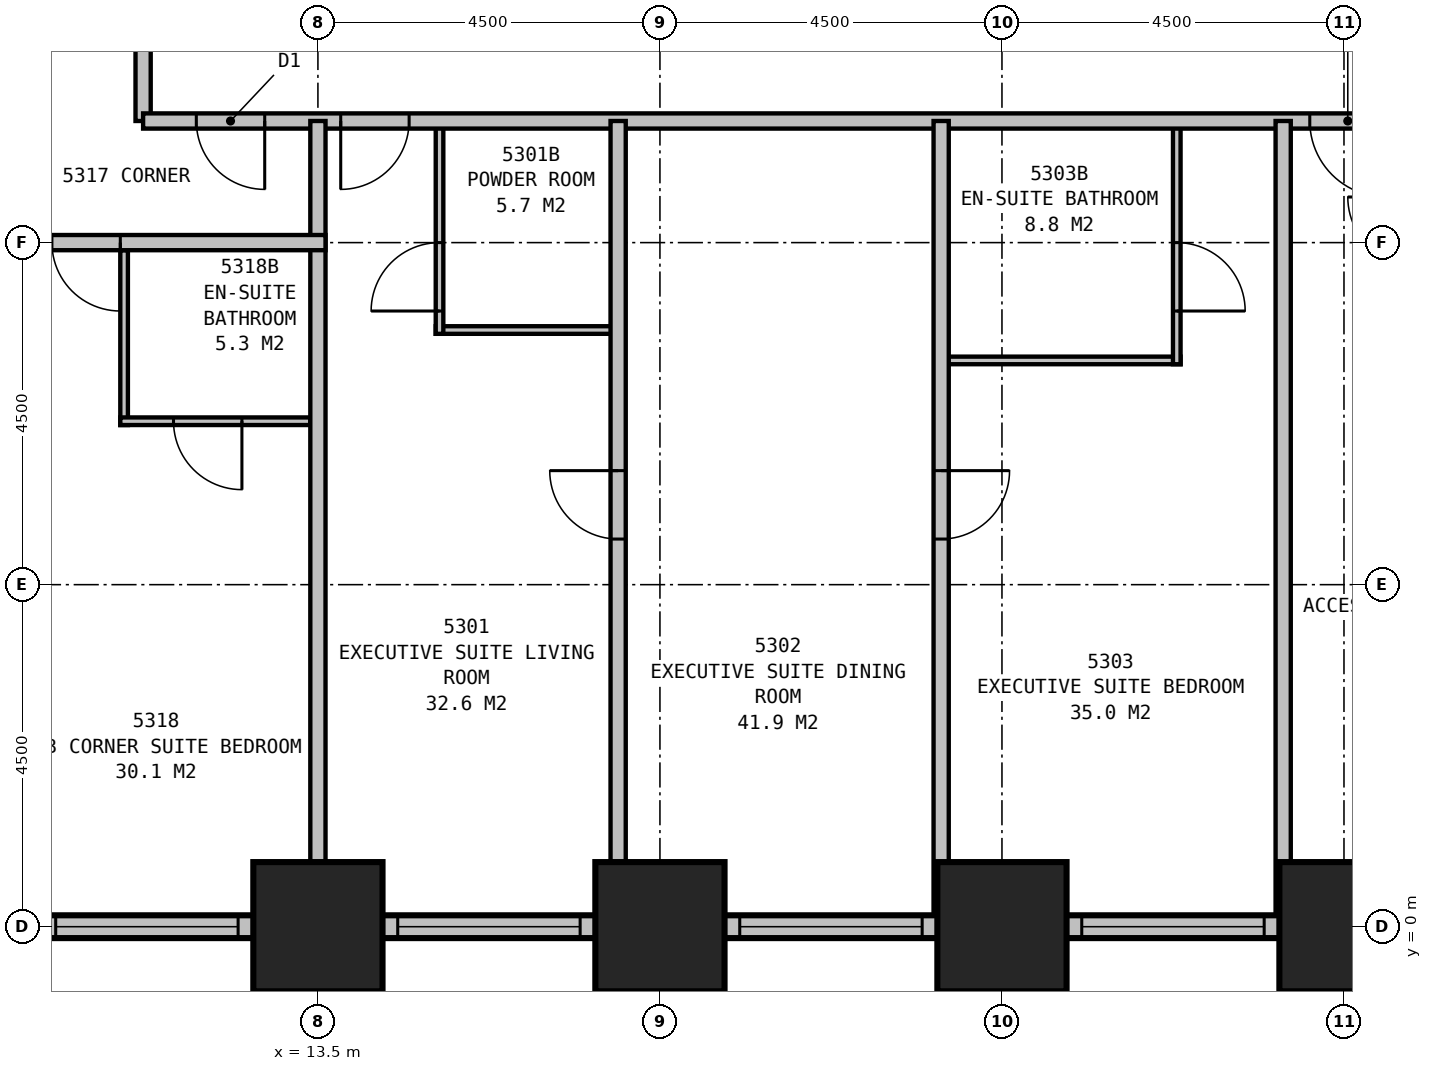
"""IFC4 building model, lengths in metres.
Left out: names, types, materials, properties, quantities, classifications, styles, units other than length and angle.
Written with IfcOpenShell. Run it as: python <this file> out.ifc"""

import sys

from ifc_helpers import new_model, si_unit, direction, frame, frame_2d, origin, origin_2d, place, context, subcontext, project, spatial, rectangle, extrude, element, fill, save


model = new_model("IFC4")
c1 = context("Model", 3, precision=1e-05, world=origin(), true_north=direction((0.0, 1.0)))
c2 = subcontext(c1, "Body", "Model", "MODEL_VIEW")
j1 = project(units=[si_unit("LENGTHUNIT", "METRE"), si_unit("PLANEANGLEUNIT", "RADIAN")], contexts=[c1])
p1 = place(None, origin())
s1 = spatial("IfcSite", under=j1, at=p1, CompositionType="ELEMENT")
p2 = place(p1, origin())
s2 = spatial("IfcBuilding", under=s1, at=p2, CompositionType="ELEMENT")
p3 = place(p2, frame((0.0, 0.0, 204.4)))
s3 = spatial("IfcBuildingStorey", under=s2, at=p3, CompositionType="ELEMENT", Elevation=204.4)
for number, where, z_axis, x_axis in (
    (1, (13.5, 0.0, 0.0), (0.0, 0.0, 1.0), (1.0, 0.0, 0.0)),
    (2, (18.0, 0.0, 0.0), (0.0, 0.0, 1.0), (1.0, 0.0, 0.0)),
    (3, (22.5, 0.0, 0.0), (0.0, 0.0, 1.0), (1.0, 0.0, 0.0)),
    (4, (27.0, 0.0, 0.0), (0.0, 0.0, 1.0), (1.0, 0.0, 0.0)),
):
    element("IfcColumn", number, at=place(p3, frame(where, z_axis=z_axis, x_axis=x_axis)), inside=s3, PredefinedType="COLUMN", context=c2, shape_type="SweptSolid", body=[
        extrude(rectangle(XDim=1.7, YDim=1.7, at=origin_2d()), origin(), (0.0, 0.0, 1.0), 3.5),
    ])
p4 = place(p3, frame((8.85, 0.0, 0.0), z_axis=(0.0, 0.0, 1.0), x_axis=(1.0, 0.0, 0.0)))
e5 = element("IfcWall", 5, at=p4, inside=s3, PredefinedType="STANDARD", context=c2, shape_type="SweptSolid", body=[
    extrude(rectangle(XDim=36.3, YDim=0.3, at=frame_2d((18.15, 0.0))), origin(), (0.0, 0.0, 1.0), 2.25),
])
p5 = place(p4, frame((1.2, 0.0, 0.5)))
e6 = element("IfcOpeningElement", 6, at=p5, cuts=e5, PredefinedType="OPENING", context=c2, shape_type="SweptSolid", body=[
    extrude(rectangle(XDim=2.4, YDim=1.6, at=frame_2d((1.2, 0.8))), frame((0.0, 0.16, 0.0), z_axis=(0.0, -1.0, 0.0), x_axis=(1.0, 0.0, 0.0)), (0.0, 0.0, 1.0), 0.32),
])
p6 = place(p4, frame((5.7, 0.0, 0.5)))
e7 = element("IfcOpeningElement", 7, at=p6, cuts=e5, PredefinedType="OPENING", context=c2, shape_type="SweptSolid", body=[
    extrude(rectangle(XDim=2.4, YDim=1.6, at=frame_2d((1.2, 0.8))), frame((0.0, 0.16, 0.0), z_axis=(0.0, -1.0, 0.0), x_axis=(1.0, 0.0, 0.0)), (0.0, 0.0, 1.0), 0.32),
])
p7 = place(p4, frame((10.2, 0.0, 0.5)))
e8 = element("IfcOpeningElement", 8, at=p7, cuts=e5, PredefinedType="OPENING", context=c2, shape_type="SweptSolid", body=[
    extrude(rectangle(XDim=2.4, YDim=1.6, at=frame_2d((1.2, 0.8))), frame((0.0, 0.16, 0.0), z_axis=(0.0, -1.0, 0.0), x_axis=(1.0, 0.0, 0.0)), (0.0, 0.0, 1.0), 0.32),
])
p8 = place(p4, frame((14.7, 0.0, 0.5)))
e9 = element("IfcOpeningElement", 9, at=p8, cuts=e5, PredefinedType="OPENING", context=c2, shape_type="SweptSolid", body=[
    extrude(rectangle(XDim=2.4, YDim=1.6, at=frame_2d((1.2, 0.8))), frame((0.0, 0.16, 0.0), z_axis=(0.0, -1.0, 0.0), x_axis=(1.0, 0.0, 0.0)), (0.0, 0.0, 1.0), 0.32),
])
p9 = place(p4, frame((19.2, 0.0, 0.5)))
e10 = element("IfcOpeningElement", 10, at=p9, cuts=e5, PredefinedType="OPENING", context=c2, shape_type="SweptSolid", body=[
    extrude(rectangle(XDim=2.4, YDim=1.6, at=frame_2d((1.2, 0.8))), frame((0.0, 0.16, 0.0), z_axis=(0.0, -1.0, 0.0), x_axis=(1.0, 0.0, 0.0)), (0.0, 0.0, 1.0), 0.32),
])
p10 = place(p4, frame((23.7, 0.0, 0.5)))
e11 = element("IfcOpeningElement", 11, at=p10, cuts=e5, PredefinedType="OPENING", context=c2, shape_type="SweptSolid", body=[
    extrude(rectangle(XDim=2.4, YDim=1.6, at=frame_2d((1.2, 0.8))), frame((0.0, 0.16, 0.0), z_axis=(0.0, -1.0, 0.0), x_axis=(1.0, 0.0, 0.0)), (0.0, 0.0, 1.0), 0.32),
])
p11 = place(p4, frame((28.2, 0.0, 0.5)))
e12 = element("IfcOpeningElement", 12, at=p11, cuts=e5, PredefinedType="OPENING", context=c2, shape_type="SweptSolid", body=[
    extrude(rectangle(XDim=2.4, YDim=1.6, at=frame_2d((1.2, 0.8))), frame((0.0, 0.16, 0.0), z_axis=(0.0, -1.0, 0.0), x_axis=(1.0, 0.0, 0.0)), (0.0, 0.0, 1.0), 0.32),
])
p12 = place(p4, frame((32.7, 0.0, 0.5)))
e13 = element("IfcOpeningElement", 13, at=p12, cuts=e5, PredefinedType="OPENING", context=c2, shape_type="SweptSolid", body=[
    extrude(rectangle(XDim=2.4, YDim=1.6, at=frame_2d((1.2, 0.8))), frame((0.0, 0.16, 0.0), z_axis=(0.0, -1.0, 0.0), x_axis=(1.0, 0.0, 0.0)), (0.0, 0.0, 1.0), 0.32),
])
p13 = place(p3, frame((11.2, 10.6, 0.0), z_axis=(0.0, 0.0, 1.0), x_axis=(1.0, 0.0, 0.0)))
e14 = element("IfcWall", 14, at=p13, inside=s3, PredefinedType="PARTITIONING", context=c2, shape_type="SweptSolid", body=[
    extrude(rectangle(XDim=27.1, YDim=0.2, at=frame_2d((13.55, 0.0))), origin(), (0.0, 0.0, 1.0), 3.25),
])
p14 = place(p13, frame((3.5, 0.0, 0.0), z_axis=(0.0, 0.0, 1.0), x_axis=(-1.0, 0.0, 0.0)))
e15 = element("IfcOpeningElement", 15, at=p14, cuts=e14, PredefinedType="OPENING", context=c2, shape_type="SweptSolid", body=[
    extrude(rectangle(XDim=0.9, YDim=2.1, at=frame_2d((0.45, 1.05))), frame((0.0, 0.11, 0.0), z_axis=(0.0, -1.0, 0.0), x_axis=(1.0, 0.0, 0.0)), (0.0, 0.0, 1.0), 0.22),
])
p15 = place(p13, frame((16.35, 0.0, 0.0), z_axis=(0.0, 0.0, 1.0), x_axis=(-1.0, 0.0, 0.0)))
e16 = element("IfcOpeningElement", 16, at=p15, cuts=e14, PredefinedType="OPENING", context=c2, shape_type="SweptSolid", body=[
    extrude(rectangle(XDim=1.0, YDim=2.1, at=frame_2d((0.5, 1.05))), frame((0.0, 0.11, 0.0), z_axis=(0.0, -1.0, 0.0), x_axis=(1.0, 0.0, 0.0)), (0.0, 0.0, 1.0), 0.22),
])
p16 = place(p13, frame((21.65, 0.0, 0.0), z_axis=(0.0, 0.0, 1.0), x_axis=(-1.0, 0.0, 0.0)))
e17 = element("IfcOpeningElement", 17, at=p16, cuts=e14, PredefinedType="OPENING", context=c2, shape_type="SweptSolid", body=[
    extrude(rectangle(XDim=0.9, YDim=2.1, at=frame_2d((0.45, 1.05))), frame((0.0, 0.11, 0.0), z_axis=(0.0, -1.0, 0.0), x_axis=(1.0, 0.0, 0.0)), (0.0, 0.0, 1.0), 0.22),
])
p17 = place(p13, frame((1.6, 0.0, 0.0), z_axis=(0.0, 0.0, 1.0), x_axis=(-1.0, 0.0, 0.0)))
e18 = element("IfcOpeningElement", 18, at=p17, cuts=e14, PredefinedType="OPENING", context=c2, shape_type="SweptSolid", body=[
    extrude(rectangle(XDim=0.9, YDim=2.1, at=frame_2d((0.45, 1.05))), frame((0.0, 0.11, 0.0), z_axis=(0.0, -1.0, 0.0), x_axis=(1.0, 0.0, 0.0)), (0.0, 0.0, 1.0), 0.22),
])
p18 = place(p13, frame((26.4, 0.0, 0.0), z_axis=(0.0, 0.0, 1.0), x_axis=(-1.0, 0.0, 0.0)))
e19 = element("IfcOpeningElement", 19, at=p18, cuts=e14, PredefinedType="OPENING", context=c2, shape_type="SweptSolid", body=[
    extrude(rectangle(XDim=0.9, YDim=2.1, at=frame_2d((0.45, 1.05))), frame((0.0, 0.11, 0.0), z_axis=(0.0, -1.0, 0.0), x_axis=(1.0, 0.0, 0.0)), (0.0, 0.0, 1.0), 0.22),
])
p19 = place(p3, frame((11.2, 10.6, 0.0), z_axis=(0.0, 0.0, 1.0), x_axis=(0.0, 1.0, 0.0)))
e20 = element("IfcWall", 20, at=p19, inside=s3, PredefinedType="PARTITIONING", context=c2, shape_type="SweptSolid", body=[
    extrude(rectangle(XDim=18.7, YDim=0.2, at=frame_2d((9.35, 0.0))), origin(), (0.0, 0.0, 1.0), 3.25),
])
p20 = place(p19, frame((4.9, 0.0, 0.0)))
e21 = element("IfcOpeningElement", 21, at=p20, cuts=e20, PredefinedType="OPENING", context=c2, shape_type="SweptSolid", body=[
    extrude(rectangle(XDim=1.0, YDim=2.1, at=frame_2d((0.5, 1.05))), frame((0.0, 0.11, 0.0), z_axis=(0.0, -1.0, 0.0), x_axis=(1.0, 0.0, 0.0)), (0.0, 0.0, 1.0), 0.22),
])
p21 = place(p19, frame((9.35, 0.0, 0.0)))
e22 = element("IfcOpeningElement", 22, at=p21, cuts=e20, PredefinedType="OPENING", context=c2, shape_type="SweptSolid", body=[
    extrude(rectangle(XDim=0.9, YDim=2.1, at=frame_2d((0.45, 1.05))), frame((0.0, 0.11, 0.0), z_axis=(0.0, -1.0, 0.0), x_axis=(1.0, 0.0, 0.0)), (0.0, 0.0, 1.0), 0.22),
])
p22 = place(p3, frame((17.45, 10.6, 0.0), z_axis=(0.0, 0.0, 1.0), x_axis=(0.0, -1.0, 0.0)))
e23 = element("IfcWall", 23, at=p22, inside=s3, PredefinedType="PARTITIONING", context=c2, shape_type="SweptSolid", body=[
    extrude(rectangle(XDim=10.6, YDim=0.2, at=frame_2d((5.3, 0.0))), origin(), (0.0, 0.0, 1.0), 2.25),
])
p23 = place(p22, frame((5.5, 0.0, 0.0), z_axis=(0.0, 0.0, 1.0), x_axis=(-1.0, 0.0, 0.0)))
e24 = element("IfcOpeningElement", 24, at=p23, cuts=e23, PredefinedType="OPENING", context=c2, shape_type="SweptSolid", body=[
    extrude(rectangle(XDim=0.9, YDim=2.1, at=frame_2d((0.45, 1.05))), frame((0.0, 0.11, 0.0), z_axis=(0.0, -1.0, 0.0), x_axis=(1.0, 0.0, 0.0)), (0.0, 0.0, 1.0), 0.22),
])
p24 = place(p3, frame((21.7, 10.6, 0.0), z_axis=(0.0, 0.0, 1.0), x_axis=(0.0, -1.0, 0.0)))
e25 = element("IfcWall", 25, at=p24, inside=s3, PredefinedType="PARTITIONING", context=c2, shape_type="SweptSolid", body=[
    extrude(rectangle(XDim=10.6, YDim=0.2, at=frame_2d((5.3, 0.0))), origin(), (0.0, 0.0, 1.0), 2.25),
])
p25 = place(p24, frame((4.6, 0.0, 0.0)))
e26 = element("IfcOpeningElement", 26, at=p25, cuts=e25, PredefinedType="OPENING", context=c2, shape_type="SweptSolid", body=[
    extrude(rectangle(XDim=0.9, YDim=2.1, at=frame_2d((0.45, 1.05))), frame((0.0, 0.11, 0.0), z_axis=(0.0, -1.0, 0.0), x_axis=(1.0, 0.0, 0.0)), (0.0, 0.0, 1.0), 0.22),
])
p26 = place(p3, frame((26.2, 10.6, 0.0), z_axis=(0.0, 0.0, 1.0), x_axis=(0.0, -1.0, 0.0)))
e27 = element("IfcWall", 27, at=p26, inside=s3, PredefinedType="PARTITIONING", context=c2, shape_type="SweptSolid", body=[
    extrude(rectangle(XDim=10.6, YDim=0.2, at=frame_2d((5.3, 0.0))), origin(), (0.0, 0.0, 1.0), 2.25),
])
p27 = place(p3, frame((15.05, 7.85, 0.0), z_axis=(0.0, 0.0, 1.0), x_axis=(1.0, 0.0, 0.0)))
e28 = element("IfcWall", 28, at=p27, inside=s3, PredefinedType="PLUMBINGWALL", context=c2, shape_type="SweptSolid", body=[
    extrude(rectangle(XDim=2.4, YDim=0.1, at=frame_2d((1.2, 0.0))), origin(), (0.0, 0.0, 1.0), 3.25),
])
p28 = place(p3, frame((15.1, 10.6, 0.0), z_axis=(0.0, 0.0, 1.0), x_axis=(0.0, -1.0, 0.0)))
e29 = element("IfcWall", 29, at=p28, inside=s3, PredefinedType="PLUMBINGWALL", context=c2, shape_type="SweptSolid", body=[
    extrude(rectangle(XDim=2.8, YDim=0.1, at=frame_2d((1.4, 0.0))), origin(), (0.0, 0.0, 1.0), 3.25),
])
p29 = place(p28, frame((2.5, 0.0, 0.0), z_axis=(0.0, 0.0, 1.0), x_axis=(-1.0, 0.0, 0.0)))
e30 = element("IfcOpeningElement", 30, at=p29, cuts=e29, PredefinedType="OPENING", context=c2, shape_type="SweptSolid", body=[
    extrude(rectangle(XDim=0.9, YDim=2.1, at=frame_2d((0.45, 1.05))), frame((0.0, 0.06, 0.0), z_axis=(0.0, -1.0, 0.0), x_axis=(1.0, 0.0, 0.0)), (0.0, 0.0, 1.0), 0.12),
])
p30 = place(p3, frame((21.7, 7.45, 0.0), z_axis=(0.0, 0.0, 1.0), x_axis=(1.0, 0.0, 0.0)))
e31 = element("IfcWall", 31, at=p30, inside=s3, PredefinedType="PLUMBINGWALL", context=c2, shape_type="SweptSolid", body=[
    extrude(rectangle(XDim=3.15, YDim=0.1, at=frame_2d((1.575, 0.0))), origin(), (0.0, 0.0, 1.0), 3.25),
])
p31 = place(p3, frame((24.8, 10.6, 0.0), z_axis=(0.0, 0.0, 1.0), x_axis=(0.0, -1.0, 0.0)))
e32 = element("IfcWall", 32, at=p31, inside=s3, PredefinedType="PLUMBINGWALL", context=c2, shape_type="SweptSolid", body=[
    extrude(rectangle(XDim=3.2, YDim=0.1, at=frame_2d((1.6, 0.0))), origin(), (0.0, 0.0, 1.0), 3.25),
])
p32 = place(p31, frame((1.6, 0.0, 0.0)))
e33 = element("IfcOpeningElement", 33, at=p32, cuts=e32, PredefinedType="OPENING", context=c2, shape_type="SweptSolid", body=[
    extrude(rectangle(XDim=0.9, YDim=2.1, at=frame_2d((0.45, 1.05))), frame((0.0, 0.06, 0.0), z_axis=(0.0, -1.0, 0.0), x_axis=(1.0, 0.0, 0.0)), (0.0, 0.0, 1.0), 0.12),
])
p33 = place(p3, frame((13.5, 10.6, 0.0), z_axis=(0.0, 0.0, 1.0), x_axis=(0.0, -1.0, 0.0)))
e34 = element("IfcWall", 34, at=p33, inside=s3, PredefinedType="PARTITIONING", context=c2, shape_type="SweptSolid", body=[
    extrude(rectangle(XDim=10.6, YDim=0.2, at=frame_2d((5.3, 0.0))), origin(), (0.0, 0.0, 1.0), 2.25),
])
p34 = place(p3, frame((13.6, 9.0, 0.0), z_axis=(0.0, 0.0, 1.0), x_axis=(-1.0, 0.0, 0.0)))
e35 = element("IfcWall", 35, at=p34, inside=s3, PredefinedType="PARTITIONING", context=c2, shape_type="SweptSolid", body=[
    extrude(rectangle(XDim=4.6, YDim=0.2, at=frame_2d((2.3, 0.0))), origin(), (0.0, 0.0, 1.0), 3.25),
])
p35 = place(p34, frame((2.7, 0.0, 0.0)))
e36 = element("IfcOpeningElement", 36, at=p35, cuts=e35, PredefinedType="OPENING", context=c2, shape_type="SweptSolid", body=[
    extrude(rectangle(XDim=0.9, YDim=2.1, at=frame_2d((0.45, 1.05))), frame((0.0, 0.11, 0.0), z_axis=(0.0, -1.0, 0.0), x_axis=(1.0, 0.0, 0.0)), (0.0, 0.0, 1.0), 0.22),
])
p36 = place(p3, frame((10.95, 8.9, 0.0), z_axis=(0.0, 0.0, 1.0), x_axis=(0.0, -1.0, 0.0)))
e37 = element("IfcWall", 37, at=p36, inside=s3, PredefinedType="PLUMBINGWALL", context=c2, shape_type="SweptSolid", body=[
    extrude(rectangle(XDim=2.3, YDim=0.1, at=frame_2d((1.15, 0.0))), origin(), (0.0, 0.0, 1.0), 3.25),
])
p37 = place(p3, frame((13.4, 6.65, 0.0), z_axis=(0.0, 0.0, 1.0), x_axis=(-1.0, 0.0, 0.0)))
e38 = element("IfcWall", 38, at=p37, inside=s3, PredefinedType="PLUMBINGWALL", context=c2, shape_type="SweptSolid", body=[
    extrude(rectangle(XDim=2.5, YDim=0.1, at=frame_2d((1.25, 0.0))), origin(), (0.0, 0.0, 1.0), 3.25),
])
p38 = place(p37, frame((0.9, 0.0, 0.0)))
e39 = element("IfcOpeningElement", 39, at=p38, cuts=e38, PredefinedType="OPENING", context=c2, shape_type="SweptSolid", body=[
    extrude(rectangle(XDim=0.9, YDim=2.1, at=frame_2d((0.45, 1.05))), frame((0.0, 0.06, 0.0), z_axis=(0.0, -1.0, 0.0), x_axis=(1.0, 0.0, 0.0)), (0.0, 0.0, 1.0), 0.12),
])
p39 = place(p5, origin())
e40 = element("IfcWindow", 40, at=p39, inside=s3, PartitioningType="SINGLE_PANEL", PredefinedType="WINDOW", context=c2, shape_type="SweptSolid", body=[
    extrude(rectangle(XDim=2.4, YDim=1.6, at=frame_2d((1.2, 0.8))), frame((0.0, 0.03, 0.0), z_axis=(0.0, -1.0, 0.0), x_axis=(1.0, 0.0, 0.0)), (0.0, 0.0, 1.0), 0.06),
])
fill(e6, e40)
p40 = place(p6, origin())
e41 = element("IfcWindow", 41, at=p40, inside=s3, PartitioningType="SINGLE_PANEL", PredefinedType="WINDOW", context=c2, shape_type="SweptSolid", body=[
    extrude(rectangle(XDim=2.4, YDim=1.6, at=frame_2d((1.2, 0.8))), frame((0.0, 0.03, 0.0), z_axis=(0.0, -1.0, 0.0), x_axis=(1.0, 0.0, 0.0)), (0.0, 0.0, 1.0), 0.06),
])
fill(e7, e41)
p41 = place(p7, origin())
e42 = element("IfcWindow", 42, at=p41, inside=s3, PartitioningType="SINGLE_PANEL", PredefinedType="WINDOW", context=c2, shape_type="SweptSolid", body=[
    extrude(rectangle(XDim=2.4, YDim=1.6, at=frame_2d((1.2, 0.8))), frame((0.0, 0.03, 0.0), z_axis=(0.0, -1.0, 0.0), x_axis=(1.0, 0.0, 0.0)), (0.0, 0.0, 1.0), 0.06),
])
fill(e8, e42)
p42 = place(p8, origin())
e43 = element("IfcWindow", 43, at=p42, inside=s3, PartitioningType="SINGLE_PANEL", PredefinedType="WINDOW", context=c2, shape_type="SweptSolid", body=[
    extrude(rectangle(XDim=2.4, YDim=1.6, at=frame_2d((1.2, 0.8))), frame((0.0, 0.03, 0.0), z_axis=(0.0, -1.0, 0.0), x_axis=(1.0, 0.0, 0.0)), (0.0, 0.0, 1.0), 0.06),
])
fill(e9, e43)
p43 = place(p14, origin())
e44 = element("IfcDoor", 44, at=p43, inside=s3, OperationType="SINGLE_SWING_RIGHT", PredefinedType="DOOR", context=c2, shape_type="SweptSolid", body=[
    extrude(rectangle(XDim=0.9, YDim=2.1, at=frame_2d((0.45, 1.05))), frame((0.0, 0.025, 0.0), z_axis=(0.0, -1.0, 0.0), x_axis=(1.0, 0.0, 0.0)), (0.0, 0.0, 1.0), 0.05),
])
fill(e15, e44)
p44 = place(p15, origin())
e45 = element("IfcDoor", 45, at=p44, inside=s3, OperationType="SINGLE_SWING_LEFT", PredefinedType="DOOR", context=c2, shape_type="SweptSolid", body=[
    extrude(rectangle(XDim=1.0, YDim=2.1, at=frame_2d((0.5, 1.05))), frame((0.0, 0.025, 0.0), z_axis=(0.0, -1.0, 0.0), x_axis=(1.0, 0.0, 0.0)), (0.0, 0.0, 1.0), 0.05),
])
fill(e16, e45)
p45 = place(p17, origin())
e46 = element("IfcDoor", 46, at=p45, inside=s3, OperationType="SINGLE_SWING_LEFT", PredefinedType="DOOR", context=c2, shape_type="SweptSolid", body=[
    extrude(rectangle(XDim=0.9, YDim=2.1, at=frame_2d((0.45, 1.05))), frame((0.0, 0.025, 0.0), z_axis=(0.0, -1.0, 0.0), x_axis=(1.0, 0.0, 0.0)), (0.0, 0.0, 1.0), 0.05),
])
fill(e18, e46)
p46 = place(p23, origin())
e47 = element("IfcDoor", 47, at=p46, inside=s3, OperationType="SINGLE_SWING_RIGHT", PredefinedType="DOOR", context=c2, shape_type="SweptSolid", body=[
    extrude(rectangle(XDim=0.9, YDim=2.1, at=frame_2d((0.45, 1.05))), frame((0.0, 0.025, 0.0), z_axis=(0.0, -1.0, 0.0), x_axis=(1.0, 0.0, 0.0)), (0.0, 0.0, 1.0), 0.05),
])
fill(e24, e47)
p47 = place(p25, origin())
e48 = element("IfcDoor", 48, at=p47, inside=s3, OperationType="SINGLE_SWING_LEFT", PredefinedType="DOOR", context=c2, shape_type="SweptSolid", body=[
    extrude(rectangle(XDim=0.9, YDim=2.1, at=frame_2d((0.45, 1.05))), frame((0.0, 0.025, 0.0), z_axis=(0.0, -1.0, 0.0), x_axis=(1.0, 0.0, 0.0)), (0.0, 0.0, 1.0), 0.05),
])
fill(e26, e48)
p48 = place(p29, origin())
e49 = element("IfcDoor", 49, at=p48, inside=s3, OperationType="SINGLE_SWING_LEFT", PredefinedType="DOOR", context=c2, shape_type="SweptSolid", body=[
    extrude(rectangle(XDim=0.9, YDim=2.1, at=frame_2d((0.45, 1.05))), frame((0.0, 0.025, 0.0), z_axis=(0.0, -1.0, 0.0), x_axis=(1.0, 0.0, 0.0)), (0.0, 0.0, 1.0), 0.05),
])
fill(e30, e49)
p49 = place(p32, origin())
e50 = element("IfcDoor", 50, at=p49, inside=s3, OperationType="SINGLE_SWING_RIGHT", PredefinedType="DOOR", context=c2, shape_type="SweptSolid", body=[
    extrude(rectangle(XDim=0.9, YDim=2.1, at=frame_2d((0.45, 1.05))), frame((0.0, 0.025, 0.0), z_axis=(0.0, -1.0, 0.0), x_axis=(1.0, 0.0, 0.0)), (0.0, 0.0, 1.0), 0.05),
])
fill(e33, e50)
p50 = place(p35, origin())
e51 = element("IfcDoor", 51, at=p50, inside=s3, OperationType="SINGLE_SWING_LEFT", PredefinedType="DOOR", context=c2, shape_type="SweptSolid", body=[
    extrude(rectangle(XDim=0.9, YDim=2.1, at=frame_2d((0.45, 1.05))), frame((0.0, 0.025, 0.0), z_axis=(0.0, -1.0, 0.0), x_axis=(1.0, 0.0, 0.0)), (0.0, 0.0, 1.0), 0.05),
])
fill(e36, e51)
p51 = place(p38, origin())
e52 = element("IfcDoor", 52, at=p51, inside=s3, OperationType="SINGLE_SWING_LEFT", PredefinedType="DOOR", context=c2, shape_type="SweptSolid", body=[
    extrude(rectangle(XDim=0.9, YDim=2.1, at=frame_2d((0.45, 1.05))), frame((0.0, 0.025, 0.0), z_axis=(0.0, -1.0, 0.0), x_axis=(1.0, 0.0, 0.0)), (0.0, 0.0, 1.0), 0.05),
])
fill(e39, e52)
save(model, sys.argv[1])
